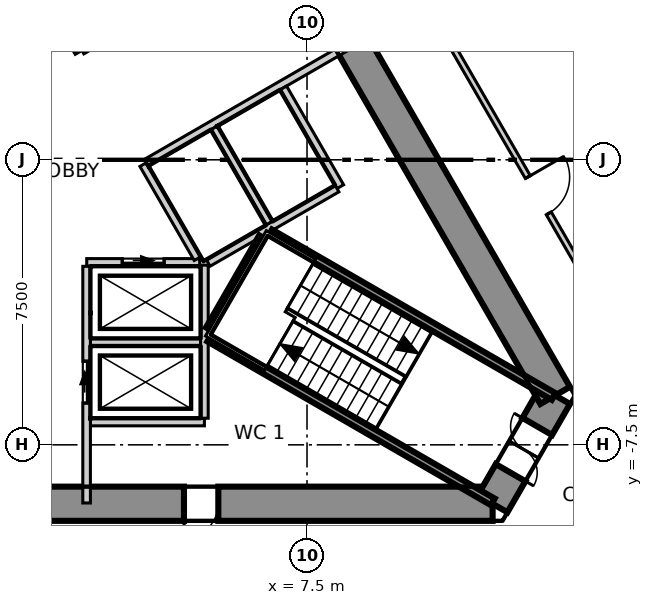
"""IFC4 building model, lengths in metres.
Left out: names, types, materials, properties, quantities, classifications, styles, units other than length and angle.
Written with IfcOpenShell. Run it as: python <this file> out.ifc"""

import sys

from ifc_helpers import new_model, si_unit, direction, frame, frame_2d, origin, place, context, subcontext, project, spatial, polyline, rectangle, outline, extrude, element, fill, save


model = new_model("IFC4")
c1 = context("Model", 3, precision=1e-05, world=origin(), true_north=direction((0.0, 1.0)))
c2 = subcontext(c1, "Body", "Model", "MODEL_VIEW")
j1 = project(units=[si_unit("LENGTHUNIT", "METRE"), si_unit("PLANEANGLEUNIT", "RADIAN")], contexts=[c1])
p1 = place(None, origin())
s1 = spatial("IfcSite", under=j1, at=p1, CompositionType="ELEMENT")
p2 = place(p1, origin())
s2 = spatial("IfcBuilding", under=s1, at=p2, CompositionType="ELEMENT")
p3 = place(p2, frame((0.0, 0.0, 35.3)))
s3 = spatial("IfcBuildingStorey", under=s2, at=p3, CompositionType="ELEMENT", Elevation=35.3)
p4 = place(p3, frame((-12.384, -9.05, -0.3), z_axis=(0.0, 0.0, 1.0), x_axis=(1.0, 0.0, 0.0)))
e1 = element("IfcWall", 1, at=p4, inside=s3, PredefinedType="SHEAR", context=c2, shape_type="SweptSolid", body=[
    extrude(outline(polyline([(-0.26, -0.45), (1.685, -0.45), (3.63, -0.45), (5.576, -0.45), (7.521, -0.45), (9.466, -0.45), (11.411, -0.45), (13.357, -0.45), (15.302, -0.45), (17.247, -0.45), (19.192, -0.45), (21.138, -0.45), (23.083, -0.45), (25.028, -0.45), (24.508, 0.45), (22.643, 0.45), (20.778, 0.45), (18.912, 0.45), (17.047, 0.45), (15.182, 0.45), (13.317, 0.45), (11.451, 0.45), (9.586, 0.45), (7.721, 0.45), (5.856, 0.45), (3.99, 0.45), (2.125, 0.45), (0.26, 0.45), (-0.26, -0.45)])), origin(), (0.0, 0.0, 1.0), 4.0),
])
p5 = place(p4, frame((16.648, 0.0, 0.3)))
e2 = element("IfcOpeningElement", 2, at=p5, cuts=e1, PredefinedType="OPENING", context=c2, shape_type="SweptSolid", body=[
    extrude(rectangle(XDim=0.9, YDim=2.1, at=frame_2d((0.45, 1.05))), frame((0.0, 0.46, 0.0), z_axis=(0.0, -1.0, 0.0), x_axis=(1.0, 0.0, 0.0)), (0.0, 0.0, 1.0), 0.92),
])
p6 = place(p3, frame((12.384, -9.05, -0.3), z_axis=(0.0, 0.0, 1.0), x_axis=(0.500111984565, 0.865960739811, 0.0)))
e3 = element("IfcWall", 3, at=p6, inside=s3, PredefinedType="SHEAR", context=c2, shape_type="SweptSolid", body=[
    extrude(outline(polyline([(-0.26, -0.45), (1.646, -0.449), (3.551, -0.449), (3.031, 0.45), (1.646, 0.45), (0.26, 0.45), (-0.26, -0.45)])), origin(), (0.0, 0.0, 1.0), 4.0),
])
p7 = place(p6, frame((0.946, 0.0, 0.3)))
e4 = element("IfcOpeningElement", 4, at=p7, cuts=e3, PredefinedType="OPENING", context=c2, shape_type="SweptSolid", body=[
    extrude(rectangle(XDim=1.4, YDim=2.1, at=frame_2d((0.7, 1.05))), frame((0.0, 0.46, 0.0), z_axis=(0.0, -1.0, 0.0), x_axis=(1.0, 0.0, 0.0)), (0.0, 0.0, 1.0), 0.92),
])
p8 = place(p3, frame((14.03, -6.2, -0.3), z_axis=(0.0, 0.0, 1.0), x_axis=(-0.500026485275, 0.866010111964, 0.0)))
e5 = element("IfcWall", 5, at=p8, inside=s3, PredefinedType="SHEAR", context=c2, shape_type="SweptSolid", body=[
    extrude(outline(polyline([(-0.26, -0.449), (1.685, -0.449), (3.63, -0.449), (5.576, -0.449), (7.521, -0.449), (9.466, -0.449), (11.411, -0.449), (13.357, -0.449), (15.302, -0.449), (17.247, -0.45), (19.192, -0.45), (21.138, -0.45), (23.083, -0.45), (25.028, -0.45), (24.509, 0.449), (22.644, 0.449), (20.778, 0.449), (18.913, 0.449), (17.048, 0.449), (15.182, 0.449), (13.317, 0.449), (11.452, 0.449), (9.587, 0.449), (7.721, 0.45), (5.856, 0.45), (3.991, 0.45), (2.125, 0.45), (0.26, 0.45), (-0.26, -0.449)])), origin(), (0.0, 0.0, 1.0), 4.0),
])
p9 = place(p8, frame((11.484, 0.0, 0.3)))
e6 = element("IfcOpeningElement", 6, at=p9, cuts=e5, PredefinedType="OPENING", context=c2, shape_type="SweptSolid", body=[
    extrude(rectangle(XDim=1.8, YDim=2.1, at=frame_2d((0.9, 1.05))), frame((0.0, 0.46, 0.0), z_axis=(0.0, -1.0, 0.0), x_axis=(1.0, 0.0, 0.0)), (0.0, 0.0, 1.0), 0.92),
])
p10 = place(p8, frame((18.976, 0.0, 0.3)))
e7 = element("IfcOpeningElement", 7, at=p10, cuts=e5, PredefinedType="OPENING", context=c2, shape_type="SweptSolid", body=[
    extrude(rectangle(XDim=0.9, YDim=2.1, at=frame_2d((0.45, 1.05))), frame((0.0, 0.46, 0.0), z_axis=(0.0, -1.0, 0.0), x_axis=(1.0, 0.0, 0.0)), (0.0, 0.0, 1.0), 0.92),
])
p11 = place(p3, frame((35.163, -16.303, 0.0), z_axis=(0.0, 0.0, 1.0), x_axis=(-0.500012207976, 0.866018355391, 0.0)))
e8 = element("IfcWall", 8, at=p11, inside=s3, PredefinedType="ELEMENTEDWALL", context=c2, shape_type="SweptSolid", body=[
    extrude(rectangle(XDim=63.381, YDim=0.2, at=frame_2d((31.69, 0.0))), origin(), (0.0, 0.0, 1.0), 3.7),
])
p12 = place(p11, frame((2.302, 0.0, 0.9)))
e9 = element("IfcOpeningElement", 9, at=p12, cuts=e8, PredefinedType="OPENING", context=c2, shape_type="SweptSolid", body=[
    extrude(rectangle(XDim=5.6, YDim=2.5, at=frame_2d((2.8, 1.25))), frame((0.0, 0.11, 0.0), z_axis=(0.0, -1.0, 0.0), x_axis=(1.0, 0.0, 0.0)), (0.0, 0.0, 1.0), 0.22),
])
p13 = place(p11, frame((9.902, 0.0, 0.9)))
e10 = element("IfcOpeningElement", 10, at=p13, cuts=e8, PredefinedType="OPENING", context=c2, shape_type="SweptSolid", body=[
    extrude(rectangle(XDim=5.6, YDim=2.5, at=frame_2d((2.8, 1.25))), frame((0.0, 0.11, 0.0), z_axis=(0.0, -1.0, 0.0), x_axis=(1.0, 0.0, 0.0)), (0.0, 0.0, 1.0), 0.22),
])
p14 = place(p11, frame((17.501, 0.0, 0.9)))
e11 = element("IfcOpeningElement", 11, at=p14, cuts=e8, PredefinedType="OPENING", context=c2, shape_type="SweptSolid", body=[
    extrude(rectangle(XDim=5.6, YDim=2.5, at=frame_2d((2.8, 1.25))), frame((0.0, 0.11, 0.0), z_axis=(0.0, -1.0, 0.0), x_axis=(1.0, 0.0, 0.0)), (0.0, 0.0, 1.0), 0.22),
])
p15 = place(p11, frame((25.101, 0.0, 0.9)))
e12 = element("IfcOpeningElement", 12, at=p15, cuts=e8, PredefinedType="OPENING", context=c2, shape_type="SweptSolid", body=[
    extrude(rectangle(XDim=5.6, YDim=2.5, at=frame_2d((2.8, 1.25))), frame((0.0, 0.11, 0.0), z_axis=(0.0, -1.0, 0.0), x_axis=(1.0, 0.0, 0.0)), (0.0, 0.0, 1.0), 0.22),
])
p16 = place(p11, frame((32.7, 0.0, 0.9)))
e13 = element("IfcOpeningElement", 13, at=p16, cuts=e8, PredefinedType="OPENING", context=c2, shape_type="SweptSolid", body=[
    extrude(rectangle(XDim=5.6, YDim=2.5, at=frame_2d((2.8, 1.25))), frame((0.0, 0.11, 0.0), z_axis=(0.0, -1.0, 0.0), x_axis=(1.0, 0.0, 0.0)), (0.0, 0.0, 1.0), 0.22),
])
p17 = place(p11, frame((40.299, 0.0, 0.9)))
e14 = element("IfcOpeningElement", 14, at=p17, cuts=e8, PredefinedType="OPENING", context=c2, shape_type="SweptSolid", body=[
    extrude(rectangle(XDim=5.6, YDim=2.5, at=frame_2d((2.8, 1.25))), frame((0.0, 0.11, 0.0), z_axis=(0.0, -1.0, 0.0), x_axis=(1.0, 0.0, 0.0)), (0.0, 0.0, 1.0), 0.22),
])
p18 = place(p11, frame((47.899, 0.0, 0.9)))
e15 = element("IfcOpeningElement", 15, at=p18, cuts=e8, PredefinedType="OPENING", context=c2, shape_type="SweptSolid", body=[
    extrude(rectangle(XDim=5.6, YDim=2.5, at=frame_2d((2.8, 1.25))), frame((0.0, 0.11, 0.0), z_axis=(0.0, -1.0, 0.0), x_axis=(1.0, 0.0, 0.0)), (0.0, 0.0, 1.0), 0.22),
])
p19 = place(p11, frame((55.498, 0.0, 0.9)))
e16 = element("IfcOpeningElement", 16, at=p19, cuts=e8, PredefinedType="OPENING", context=c2, shape_type="SweptSolid", body=[
    extrude(rectangle(XDim=5.6, YDim=2.5, at=frame_2d((2.8, 1.25))), frame((0.0, 0.11, 0.0), z_axis=(0.0, -1.0, 0.0), x_axis=(1.0, 0.0, 0.0)), (0.0, 0.0, 1.0), 0.22),
])
p20 = place(p3, frame((0.075, 22.47, 0.0), z_axis=(0.0, 0.0, 1.0), x_axis=(0.500002280369, -0.866024087209, 0.0)))
e17 = element("IfcWall", 17, at=p20, inside=s3, PredefinedType="PARTITIONING", context=c2, shape_type="SweptSolid", body=[
    extrude(rectangle(XDim=38.844, YDim=0.15, at=frame_2d((19.422, 0.0))), origin(), (0.0, 0.0, 1.0), 3.7),
])
p21 = place(p20, frame((36.244, 0.0, 0.0)))
e18 = element("IfcOpeningElement", 18, at=p21, cuts=e17, PredefinedType="OPENING", context=c2, shape_type="SweptSolid", body=[
    extrude(rectangle(XDim=1.1, YDim=2.1, at=frame_2d((0.55, 1.05))), frame((0.0, 0.085, 0.0), z_axis=(0.0, -1.0, 0.0), x_axis=(1.0, 0.0, 0.0)), (0.0, 0.0, 1.0), 0.17),
])
p22 = place(p20, frame((26.472, 0.0, 0.0)))
e19 = element("IfcOpeningElement", 19, at=p22, cuts=e17, PredefinedType="OPENING", context=c2, shape_type="SweptSolid", body=[
    extrude(rectangle(XDim=1.1, YDim=2.1, at=frame_2d((0.55, 1.05))), frame((0.0, 0.085, 0.0), z_axis=(0.0, -1.0, 0.0), x_axis=(1.0, 0.0, 0.0)), (0.0, 0.0, 1.0), 0.17),
])
p23 = place(p20, frame((8.872, 0.0, 0.0)))
e20 = element("IfcOpeningElement", 20, at=p23, cuts=e17, PredefinedType="OPENING", context=c2, shape_type="SweptSolid", body=[
    extrude(rectangle(XDim=1.1, YDim=2.1, at=frame_2d((0.55, 1.05))), frame((0.0, 0.085, 0.0), z_axis=(0.0, -1.0, 0.0), x_axis=(1.0, 0.0, 0.0)), (0.0, 0.0, 1.0), 0.17),
])
p24 = place(p20, frame((17.672, 0.0, 0.0)))
e21 = element("IfcOpeningElement", 21, at=p24, cuts=e17, PredefinedType="OPENING", context=c2, shape_type="SweptSolid", body=[
    extrude(rectangle(XDim=0.9, YDim=2.1, at=frame_2d((0.45, 1.05))), frame((0.0, 0.085, 0.0), z_axis=(0.0, -1.0, 0.0), x_axis=(1.0, 0.0, 0.0)), (0.0, 0.0, 1.0), 0.17),
])
p25 = place(p20, frame((15.272, 0.0, 0.0)))
e22 = element("IfcOpeningElement", 22, at=p25, cuts=e17, PredefinedType="OPENING", context=c2, shape_type="SweptSolid", body=[
    extrude(rectangle(XDim=0.9, YDim=2.1, at=frame_2d((0.45, 1.05))), frame((0.0, 0.085, 0.0), z_axis=(0.0, -1.0, 0.0), x_axis=(1.0, 0.0, 0.0)), (0.0, 0.0, 1.0), 0.17),
])
p26 = place(p20, frame((1.473, 0.0, 0.0)))
e23 = element("IfcOpeningElement", 23, at=p26, cuts=e17, PredefinedType="OPENING", context=c2, shape_type="SweptSolid", body=[
    extrude(rectangle(XDim=1.1, YDim=2.1, at=frame_2d((0.55, 1.05))), frame((0.0, 0.085, 0.0), z_axis=(0.0, -1.0, 0.0), x_axis=(1.0, 0.0, 0.0)), (0.0, 0.0, 1.0), 0.17),
])
p27 = place(p3, frame((12.768, 7.285, 0.0), z_axis=(0.0, 0.0, 1.0), x_axis=(0.500015945769, -0.866016197294, 0.0)))
e24 = element("IfcWall", 24, at=p27, inside=s3, PredefinedType="PARTITIONING", context=c2, shape_type="SweptSolid", body=[
    extrude(rectangle(XDim=15.049, YDim=0.15, at=frame_2d((7.525, 0.0))), origin(), (0.0, 0.0, 1.0), 3.7),
])
p28 = place(p27, frame((7.074, 0.0, 0.0)))
e25 = element("IfcOpeningElement", 25, at=p28, cuts=e24, PredefinedType="OPENING", context=c2, shape_type="SweptSolid", body=[
    extrude(rectangle(XDim=1.0, YDim=2.1, at=frame_2d((0.5, 1.05))), frame((0.0, 0.085, 0.0), z_axis=(0.0, -1.0, 0.0), x_axis=(1.0, 0.0, 0.0)), (0.0, 0.0, 1.0), 0.17),
])
p29 = place(p3, frame((1.8, -4.8, 0.0), z_axis=(0.0, 0.0, 1.0), x_axis=(1.0, 0.0, 0.0)))
e26 = element("IfcWall", 26, at=p29, inside=s3, PredefinedType="SOLIDWALL", context=c2, shape_type="SweptSolid", body=[
    extrude(rectangle(XDim=2.9, YDim=0.2, at=frame_2d((1.45, 0.0))), origin(), (0.0, 0.0, 1.0), 3.7),
])
p30 = place(p3, frame((1.8, -6.9, 0.0), z_axis=(0.0, 0.0, 1.0), x_axis=(1.0, 0.0, 0.0)))
e27 = element("IfcWall", 27, at=p30, inside=s3, PredefinedType="SOLIDWALL", context=c2, shape_type="SweptSolid", body=[
    extrude(rectangle(XDim=3.0, YDim=0.2, at=frame_2d((1.5, 0.0))), origin(), (0.0, 0.0, 1.0), 3.7),
])
p31 = place(p3, frame((1.703, -2.7, 0.0), z_axis=(0.0, 0.0, 1.0), x_axis=(1.0, 0.0, 0.0)))
e28 = element("IfcWall", 28, at=p31, inside=s3, PredefinedType="SOLIDWALL", context=c2, shape_type="SweptSolid", body=[
    extrude(rectangle(XDim=2.973, YDim=0.2, at=frame_2d((1.487, 0.0))), origin(), (0.0, 0.0, 1.0), 3.7),
])
p32 = place(p31, frame((0.936, 0.0, 0.0)))
e29 = element("IfcOpeningElement", 29, at=p32, cuts=e28, PredefinedType="OPENING", context=c2, shape_type="SweptSolid", body=[
    extrude(rectangle(XDim=1.1, YDim=2.1, at=frame_2d((0.55, 1.05))), frame((0.0, 0.11, 0.0), z_axis=(0.0, -1.0, 0.0), x_axis=(1.0, 0.0, 0.0)), (0.0, 0.0, 1.0), 0.22),
])
p33 = place(p3, frame((0.0, 5.4, 0.0), z_axis=(0.0, 0.0, 1.0), x_axis=(0.500103862429, -0.865965430478, 0.0)))
e30 = element("IfcWall", 30, at=p33, inside=s3, PredefinedType="SOLIDWALL", context=c2, shape_type="SweptSolid", body=[
    extrude(rectangle(XDim=2.973, YDim=0.2, at=frame_2d((1.487, 0.0))), origin(), (0.0, 0.0, 1.0), 3.7),
])
p34 = place(p33, frame((0.937, 0.0, 0.0)))
e31 = element("IfcOpeningElement", 31, at=p34, cuts=e30, PredefinedType="OPENING", context=c2, shape_type="SweptSolid", body=[
    extrude(rectangle(XDim=1.1, YDim=2.1, at=frame_2d((0.55, 1.05))), frame((0.0, 0.11, 0.0), z_axis=(0.0, -1.0, 0.0), x_axis=(1.0, 0.0, 0.0)), (0.0, 0.0, 1.0), 0.22),
])
p35 = place(p3, frame((3.19, -0.125, 0.0), z_axis=(0.0, 0.0, 1.0), x_axis=(0.499988658015, -0.866031951983, 0.0)))
e32 = element("IfcWall", 32, at=p35, inside=s3, PredefinedType="SOLIDWALL", context=c2, shape_type="SweptSolid", body=[
    extrude(rectangle(XDim=2.858, YDim=0.2, at=frame_2d((1.429, 0.0))), origin(), (0.0, 0.0, 1.0), 3.7),
])
p36 = place(p3, frame((1.578, 2.874, 0.0), z_axis=(0.0, 0.0, 1.0), x_axis=(0.866031483044, 0.499989470266, 0.0)))
e33 = element("IfcWall", 33, at=p36, inside=s3, PredefinedType="SOLIDWALL", context=c2, shape_type="SweptSolid", body=[
    extrude(rectangle(XDim=6.226, YDim=0.2, at=frame_2d((3.113, 0.0))), origin(), (0.0, 0.0, 1.0), 3.7),
])
p37 = place(p36, frame((2.496, 0.0, 0.0)))
e34 = element("IfcOpeningElement", 34, at=p37, cuts=e33, PredefinedType="OPENING", context=c2, shape_type="SweptSolid", body=[
    extrude(rectangle(XDim=1.1, YDim=2.1, at=frame_2d((0.55, 1.05))), frame((0.0, 0.11, 0.0), z_axis=(0.0, -1.0, 0.0), x_axis=(1.0, 0.0, 0.0)), (0.0, 0.0, 1.0), 0.22),
])
p38 = place(p3, frame((1.7, -9.03, 0.0), z_axis=(0.0, 0.0, 1.0), x_axis=(0.0, 1.0, 0.0)))
e35 = element("IfcWall", 35, at=p38, inside=s3, PredefinedType="SOLIDWALL", context=c2, shape_type="SweptSolid", body=[
    extrude(rectangle(XDim=6.227, YDim=0.2, at=frame_2d((3.114, 0.0))), origin(), (0.0, 0.0, 1.0), 3.7),
])
p39 = place(p38, frame((2.63, 0.0, 0.0)))
e36 = element("IfcOpeningElement", 36, at=p39, cuts=e35, PredefinedType="OPENING", context=c2, shape_type="SweptSolid", body=[
    extrude(rectangle(XDim=1.1, YDim=2.1, at=frame_2d((0.55, 1.05))), frame((0.0, 0.11, 0.0), z_axis=(0.0, -1.0, 0.0), x_axis=(1.0, 0.0, 0.0)), (0.0, 0.0, 1.0), 0.22),
])
p40 = place(p3, frame((4.8, -6.8, 0.0), z_axis=(0.0, 0.0, 1.0), x_axis=(0.0, 1.0, 0.0)))
e37 = element("IfcWall", 37, at=p40, inside=s3, PredefinedType="SOLIDWALL", context=c2, shape_type="SweptSolid", body=[
    extrude(rectangle(XDim=4.029, YDim=0.2, at=frame_2d((2.015, 0.0))), origin(), (0.0, 0.0, 1.0), 3.7),
])
p41 = place(p3, frame((3.278, -0.071, 0.0), z_axis=(0.0, 0.0, 1.0), x_axis=(0.865953757655, 0.500124074208, 0.0)))
e38 = element("IfcWall", 38, at=p41, inside=s3, PredefinedType="SOLIDWALL", context=c2, shape_type="SweptSolid", body=[
    extrude(rectangle(XDim=6.227, YDim=0.2, at=frame_2d((3.113, 0.0))), origin(), (0.0, 0.0, 1.0), 3.7),
])
p42 = place(p3, frame((6.876, 1.891, 0.0), z_axis=(0.0, 0.0, 1.0), x_axis=(0.499990139034, -0.866031096941, 0.0)))
e39 = element("IfcWall", 39, at=p42, inside=s3, PredefinedType="SOLIDWALL", context=c2, shape_type="SweptSolid", body=[
    extrude(rectangle(XDim=3.0, YDim=0.2, at=frame_2d((1.5, 0.0))), origin(), (0.0, 0.0, 1.0), 3.7),
])
p43 = place(p3, frame((5.057, 0.841, 0.0), z_axis=(0.0, 0.0, 1.0), x_axis=(0.50012328804, -0.865954211699, 0.0)))
e40 = element("IfcWall", 40, at=p43, inside=s3, PredefinedType="SOLIDWALL", context=c2, shape_type="SweptSolid", body=[
    extrude(rectangle(XDim=2.9, YDim=0.2, at=frame_2d((1.45, 0.0))), origin(), (0.0, 0.0, 1.0), 3.7),
])
p44 = place(p3, frame((4.9, -2.714, 0.0), z_axis=(0.0, 0.0, 1.0), x_axis=(0.865992350556, 0.500057245502, 0.0)))
e41 = element("IfcWall", 41, at=p44, inside=s3, PredefinedType="SOLIDWALL", context=c2, shape_type="SweptSolid", body=[
    extrude(rectangle(XDim=3.914, YDim=0.2, at=frame_2d((1.957, 0.0))), origin(), (0.0, 0.0, 1.0), 3.7),
])
p45 = place(p3, frame((4.929, -4.693, 0.0), z_axis=(0.0, 0.0, 1.0), x_axis=(0.866010975815, -0.500024989144, 0.0)))
e42 = element("IfcWall", 42, at=p45, inside=s3, PredefinedType="SOLIDWALL", context=c2, shape_type="SweptSolid", body=[
    extrude(rectangle(XDim=8.615, YDim=0.2, at=frame_2d((4.308, 0.0))), origin(), (0.0, 0.0, 1.0), 3.7),
])
p46 = place(p3, frame((4.929, -4.462, 0.0), z_axis=(0.0, 0.0, 1.0), x_axis=(0.500200581029, 0.865909567298, 0.0)))
e43 = element("IfcWall", 43, at=p46, inside=s3, PredefinedType="SOLIDWALL", context=c2, shape_type="SweptSolid", body=[
    extrude(rectangle(XDim=2.799, YDim=0.2, at=frame_2d((1.399, 0.0))), origin(), (0.0, 0.0, 1.0), 3.7),
])
p47 = place(p3, frame((6.529, -1.922, 0.0), z_axis=(0.0, 0.0, 1.0), x_axis=(0.866060059011, -0.499939970583, 0.0)))
e44 = element("IfcWall", 44, at=p47, inside=s3, PredefinedType="SOLIDWALL", context=c2, shape_type="SweptSolid", body=[
    extrude(rectangle(XDim=8.615, YDim=0.2, at=frame_2d((4.307, 0.0))), origin(), (0.0, 0.0, 1.0), 3.7),
])
p48 = place(p32, origin())
e45 = element("IfcDoor", 45, at=p48, inside=s3, OperationType="SLIDING_TO_LEFT", PredefinedType="DOOR", context=c2, shape_type="SweptSolid", body=[
    extrude(rectangle(XDim=1.1, YDim=2.1, at=frame_2d((0.55, 1.05))), frame((0.0, 0.025, 0.0), z_axis=(0.0, -1.0, 0.0), x_axis=(1.0, 0.0, 0.0)), (0.0, 0.0, 1.0), 0.05),
])
fill(e29, e45)
p49 = place(p39, origin())
e46 = element("IfcDoor", 46, at=p49, inside=s3, OperationType="SLIDING_TO_LEFT", PredefinedType="DOOR", context=c2, shape_type="SweptSolid", body=[
    extrude(rectangle(XDim=1.1, YDim=2.1, at=frame_2d((0.55, 1.05))), frame((0.0, 0.025, 0.0), z_axis=(0.0, -1.0, 0.0), x_axis=(1.0, 0.0, 0.0)), (0.0, 0.0, 1.0), 0.05),
])
fill(e36, e46)
p50 = place(p22, origin())
e47 = element("IfcDoor", 47, at=p50, inside=s3, OperationType="SINGLE_SWING_RIGHT", PredefinedType="DOOR", context=c2, shape_type="SweptSolid", body=[
    extrude(rectangle(XDim=1.1, YDim=2.1, at=frame_2d((0.55, 1.05))), frame((0.0, 0.025, 0.0), z_axis=(0.0, -1.0, 0.0), x_axis=(1.0, 0.0, 0.0)), (0.0, 0.0, 1.0), 0.05),
])
fill(e19, e47)
p51 = place(p7, origin())
e48 = element("IfcDoor", 48, at=p51, inside=s3, OperationType="DOUBLE_DOOR_SINGLE_SWING", PredefinedType="DOOR", context=c2, shape_type="SweptSolid", body=[
    extrude(rectangle(XDim=1.4, YDim=2.1, at=frame_2d((0.7, 1.05))), frame((0.0, 0.025, 0.0), z_axis=(0.0, -1.0, 0.0), x_axis=(1.0, 0.0, 0.0)), (0.0, 0.0, 1.0), 0.05),
])
fill(e4, e48)
p52 = place(p5, origin())
e49 = element("IfcDoor", 49, at=p52, inside=s3, OperationType="SINGLE_SWING_LEFT", PredefinedType="DOOR", context=c2, shape_type="SweptSolid", body=[
    extrude(rectangle(XDim=0.9, YDim=2.1, at=frame_2d((0.45, 1.05))), frame((0.0, 0.175, 0.0), z_axis=(0.0, -1.0, 0.0), x_axis=(1.0, 0.0, 0.0)), (0.0, 0.0, 1.0), 0.05),
])
fill(e2, e49)
save(model, sys.argv[1])
